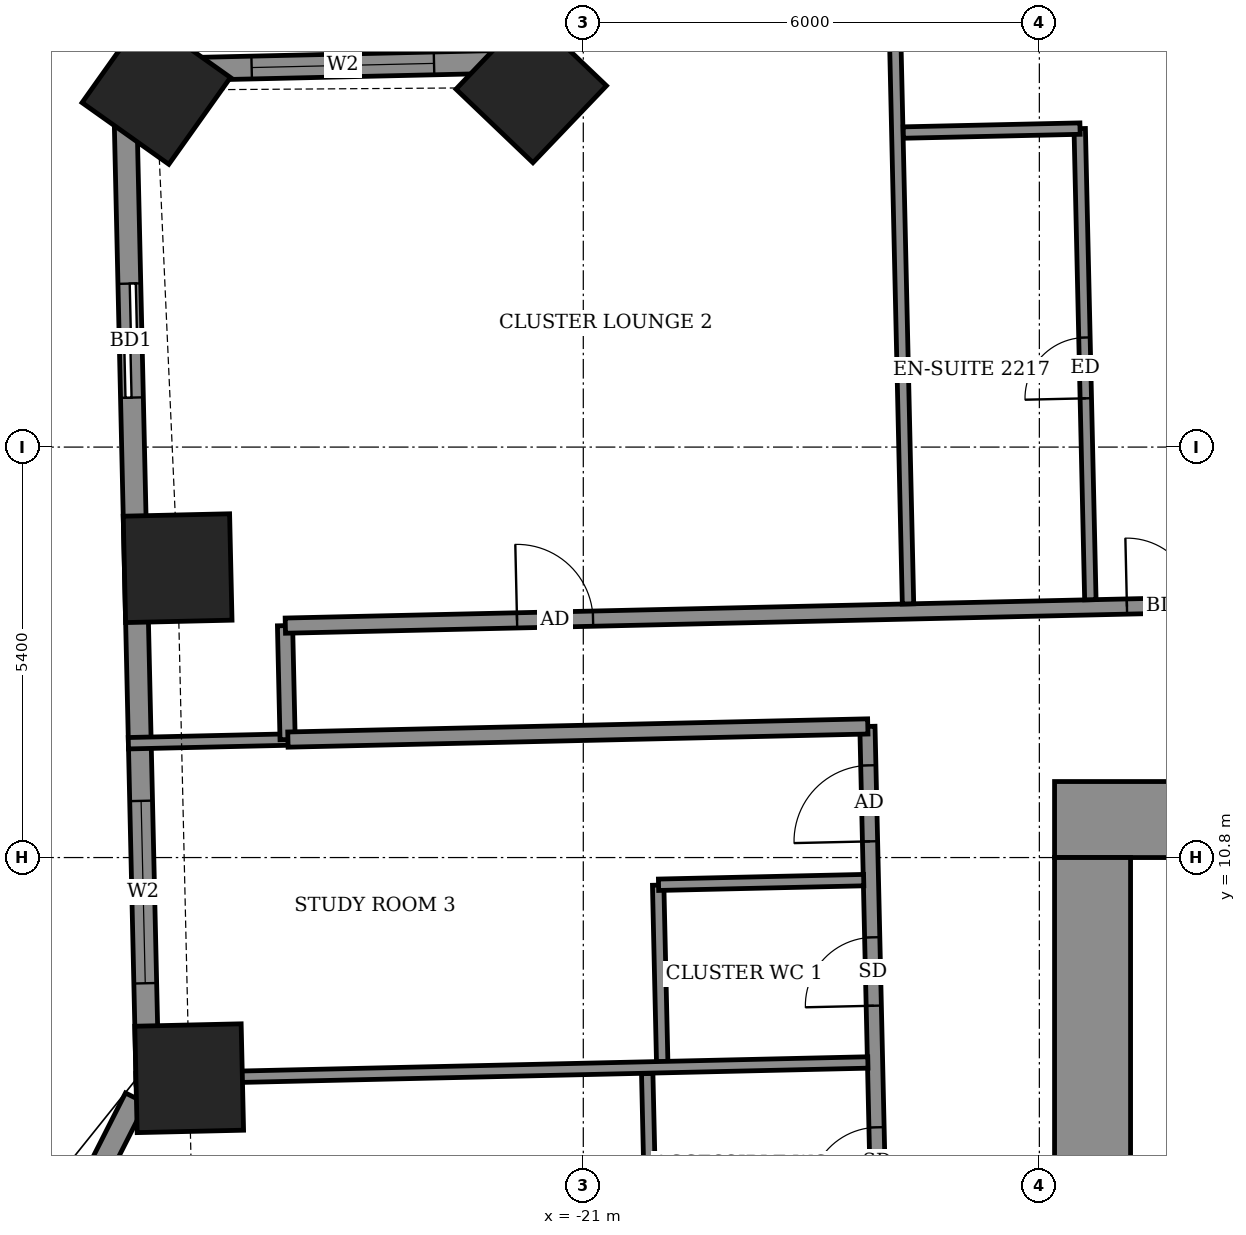
"""IFC4 building model, lengths in metres.
Left out: names, types, materials, properties, quantities, classifications, styles, units other than length and angle.
Written with IfcOpenShell. Run it as: python <this file> out.ifc"""

import sys

from ifc_helpers import new_model, si_unit, direction, frame, frame_2d, origin, origin_2d, place, context, subcontext, project, spatial, rectangle, extrude, element, fill, save


model = new_model("IFC4")
c1 = context("Model", 3, precision=1e-05, world=origin(), true_north=direction((0.0, 1.0)))
c2 = subcontext(c1, "Body", "Model", "MODEL_VIEW")
j1 = project(units=[si_unit("LENGTHUNIT", "METRE"), si_unit("PLANEANGLEUNIT", "RADIAN")], contexts=[c1])
p1 = place(None, origin())
s1 = spatial("IfcSite", under=j1, at=p1, CompositionType="ELEMENT")
p2 = place(p1, origin())
s2 = spatial("IfcBuilding", under=s1, at=p2, CompositionType="ELEMENT")
p3 = place(p2, frame((0.0, 0.0, 90.1)))
s3 = spatial("IfcBuildingStorey", under=s2, at=p3, CompositionType="ELEMENT", Elevation=90.1)
for number, where, z_axis, x_axis in (
    (1, (-21.685, 20.931, -0.55), (0.0, 0.0, 1.0), (-0.691, -0.723, 0.0)),
    (2, (-26.618, 20.897, -0.55), (0.0, 0.0, 1.0), (-0.579, -0.815, 0.0)),
    (3, (-26.337, 14.607, -0.55), (0.0, 0.0, 1.0), (0.023, -1.0, 0.0)),
    (4, (-26.185, 7.897, -0.55), (0.0, 0.0, 1.0), (0.023, -1.0, 0.0)),
):
    element("IfcColumn", number, at=place(p3, frame(where, z_axis=z_axis, x_axis=x_axis)), inside=s3, PredefinedType="COLUMN", context=c2, shape_type="SweptSolid", body=[
        extrude(rectangle(XDim=1.4, YDim=1.4, at=origin_2d()), origin(), (0.0, 0.0, 1.0), 3.6),
    ])
p4 = place(p3, frame((-22.151, 26.267, 0.0), z_axis=(0.0, 0.0, 1.0), x_axis=(0.022756903044, -0.999741028149, 0.0)))
e5 = element("IfcWall", 5, at=p4, inside=s3, PredefinedType="SOLIDWALL", context=c2, shape_type="SweptSolid", body=[
    extrude(rectangle(XDim=4.999, YDim=0.3, at=frame_2d((2.5, 0.0))), origin(), (0.0, 0.0, 1.0), 2.55),
])
p5 = place(p4, frame((1.674, 0.0, 0.9)))
e6 = element("IfcOpeningElement", 6, at=p5, cuts=e5, PredefinedType="OPENING", context=c2, shape_type="SweptSolid", body=[
    extrude(rectangle(XDim=2.4, YDim=1.5, at=frame_2d((1.2, 0.75))), frame((0.0, 0.16, 0.0), z_axis=(0.0, -1.0, 0.0), x_axis=(1.0, 0.0, 0.0)), (0.0, 0.0, 1.0), 0.32),
])
p6 = place(p3, frame((-22.037, 21.269, 0.0), z_axis=(0.0, 0.0, 1.0), x_axis=(-0.999739992103, -0.022802372469, 0.0)))
e7 = element("IfcWall", 7, at=p6, inside=s3, PredefinedType="SOLIDWALL", context=c2, shape_type="SweptSolid", body=[
    extrude(rectangle(XDim=5.0, YDim=0.3, at=frame_2d((2.5, 0.0))), origin(), (0.0, 0.0, 1.0), 2.55),
])
p7 = place(p6, frame((0.927, 0.0, 0.9)))
e8 = element("IfcOpeningElement", 8, at=p7, cuts=e7, PredefinedType="OPENING", context=c2, shape_type="SweptSolid", body=[
    extrude(rectangle(XDim=2.4, YDim=1.5, at=frame_2d((1.2, 0.75))), frame((0.0, 0.16, 0.0), z_axis=(0.0, -1.0, 0.0), x_axis=(1.0, 0.0, 0.0)), (0.0, 0.0, 1.0), 0.32),
])
p8 = place(p3, frame((-27.036, 21.155, 0.0), z_axis=(0.0, 0.0, 1.0), x_axis=(0.022730142562, -0.999741636934, 0.0)))
e9 = element("IfcWall", 9, at=p8, inside=s3, PredefinedType="SOLIDWALL", context=c2, shape_type="SweptSolid", body=[
    extrude(rectangle(XDim=13.329, YDim=0.3, at=frame_2d((6.665, 0.0))), origin(), (0.0, 0.0, 1.0), 3.05),
])
p9 = place(p8, frame((2.805, 0.0, 0.0)))
e10 = element("IfcOpeningElement", 10, at=p9, cuts=e9, PredefinedType="OPENING", context=c2, shape_type="SweptSolid", body=[
    extrude(rectangle(XDim=1.5, YDim=2.4, at=frame_2d((0.75, 1.2))), frame((0.0, 0.16, 0.0), z_axis=(0.0, -1.0, 0.0), x_axis=(1.0, 0.0, 0.0)), (0.0, 0.0, 1.0), 0.32),
])
p10 = place(p8, frame((9.612, 0.0, 0.9)))
e11 = element("IfcOpeningElement", 11, at=p10, cuts=e9, PredefinedType="OPENING", context=c2, shape_type="SweptSolid", body=[
    extrude(rectangle(XDim=2.4, YDim=1.5, at=frame_2d((1.2, 0.75))), frame((0.0, 0.16, 0.0), z_axis=(0.0, -1.0, 0.0), x_axis=(1.0, 0.0, 0.0)), (0.0, 0.0, 1.0), 0.32),
])
p11 = place(p3, frame((-26.889, 7.635, 0.0), z_axis=(0.0, 0.0, 1.0), x_axis=(-0.452633159278, -0.891696822425, 0.0)))
e12 = element("IfcWall", 12, at=p11, inside=s3, PredefinedType="SOLIDWALL", context=c2, shape_type="SweptSolid", body=[
    extrude(rectangle(XDim=5.397, YDim=0.3, at=frame_2d((2.699, 0.0))), origin(), (0.0, 0.0, 1.0), 3.05),
])
p12 = place(p11, frame((2.007, 0.0, 0.9)))
e13 = element("IfcOpeningElement", 13, at=p12, cuts=e12, PredefinedType="OPENING", context=c2, shape_type="SweptSolid", body=[
    extrude(rectangle(XDim=1.2, YDim=1.5, at=frame_2d((0.6, 0.75))), frame((0.0, 0.16, 0.0), z_axis=(0.0, -1.0, 0.0), x_axis=(1.0, 0.0, 0.0)), (0.0, 0.0, 1.0), 0.32),
])
p13 = place(p3, frame((-16.684, -12.919, 0.0), z_axis=(0.0, 0.0, 1.0), x_axis=(-0.022706151961, 0.999742182097, 0.0)))
e14 = element("IfcWall", 14, at=p13, inside=s3, PredefinedType="PARTITIONING", context=c2, shape_type="SweptSolid", body=[
    extrude(rectangle(XDim=25.45, YDim=0.2, at=frame_2d((12.725, 0.0))), origin(), (0.0, 0.0, 1.0), 3.05),
])
p14 = place(p13, frame((23.938, 0.0, 0.0)))
e15 = element("IfcOpeningElement", 15, at=p14, cuts=e14, PredefinedType="OPENING", context=c2, shape_type="SweptSolid", body=[
    extrude(rectangle(XDim=1.0, YDim=2.1, at=frame_2d((0.5, 1.05))), frame((0.0, 0.11, 0.0), z_axis=(0.0, -1.0, 0.0), x_axis=(1.0, 0.0, 0.0)), (0.0, 0.0, 1.0), 0.22),
])
p15 = place(p13, frame((21.775, 0.0, 0.0)))
e16 = element("IfcOpeningElement", 16, at=p15, cuts=e14, PredefinedType="OPENING", context=c2, shape_type="SweptSolid", body=[
    extrude(rectangle(XDim=0.9, YDim=2.1, at=frame_2d((0.45, 1.05))), frame((0.0, 0.11, 0.0), z_axis=(0.0, -1.0, 0.0), x_axis=(1.0, 0.0, 0.0)), (0.0, 0.0, 1.0), 0.22),
])
p16 = place(p13, frame((16.975, 0.0, 0.0)))
e17 = element("IfcOpeningElement", 17, at=p16, cuts=e14, PredefinedType="OPENING", context=c2, shape_type="SweptSolid", body=[
    extrude(rectangle(XDim=1.0, YDim=2.1, at=frame_2d((0.5, 1.05))), frame((0.0, 0.11, 0.0), z_axis=(0.0, -1.0, 0.0), x_axis=(1.0, 0.0, 0.0)), (0.0, 0.0, 1.0), 0.22),
])
p17 = place(p13, frame((19.275, 0.0, 0.0)))
e18 = element("IfcOpeningElement", 18, at=p17, cuts=e14, PredefinedType="OPENING", context=c2, shape_type="SweptSolid", body=[
    extrude(rectangle(XDim=0.9, YDim=2.1, at=frame_2d((0.45, 1.05))), frame((0.0, 0.11, 0.0), z_axis=(0.0, -1.0, 0.0), x_axis=(1.0, 0.0, 0.0)), (0.0, 0.0, 1.0), 0.22),
])
p18 = place(p13, frame((15.075, 0.0, 0.0)))
e19 = element("IfcOpeningElement", 19, at=p18, cuts=e14, PredefinedType="OPENING", context=c2, shape_type="SweptSolid", body=[
    extrude(rectangle(XDim=1.0, YDim=2.1, at=frame_2d((0.5, 1.05))), frame((0.0, 0.11, 0.0), z_axis=(0.0, -1.0, 0.0), x_axis=(1.0, 0.0, 0.0)), (0.0, 0.0, 1.0), 0.22),
])
p19 = place(p13, frame((12.975, 0.0, 0.0)))
e20 = element("IfcOpeningElement", 20, at=p19, cuts=e14, PredefinedType="OPENING", context=c2, shape_type="SweptSolid", body=[
    extrude(rectangle(XDim=0.9, YDim=2.1, at=frame_2d((0.45, 1.05))), frame((0.0, 0.11, 0.0), z_axis=(0.0, -1.0, 0.0), x_axis=(1.0, 0.0, 0.0)), (0.0, 0.0, 1.0), 0.22),
])
p20 = place(p13, frame((10.55, 0.0, 0.0)))
e21 = element("IfcOpeningElement", 21, at=p20, cuts=e14, PredefinedType="OPENING", context=c2, shape_type="SweptSolid", body=[
    extrude(rectangle(XDim=1.0, YDim=2.1, at=frame_2d((0.5, 1.05))), frame((0.0, 0.11, 0.0), z_axis=(0.0, -1.0, 0.0), x_axis=(1.0, 0.0, 0.0)), (0.0, 0.0, 1.0), 0.22),
])
p21 = place(p13, frame((8.125, 0.0, 0.0)))
e22 = element("IfcOpeningElement", 22, at=p21, cuts=e14, PredefinedType="OPENING", context=c2, shape_type="SweptSolid", body=[
    extrude(rectangle(XDim=0.9, YDim=2.1, at=frame_2d((0.45, 1.05))), frame((0.0, 0.11, 0.0), z_axis=(0.0, -1.0, 0.0), x_axis=(1.0, 0.0, 0.0)), (0.0, 0.0, 1.0), 0.22),
])
p22 = place(p13, frame((1.737, 0.0, 0.0)))
e23 = element("IfcOpeningElement", 23, at=p22, cuts=e14, PredefinedType="OPENING", context=c2, shape_type="SweptSolid", body=[
    extrude(rectangle(XDim=1.0, YDim=2.1, at=frame_2d((0.5, 1.05))), frame((0.0, 0.11, 0.0), z_axis=(0.0, -1.0, 0.0), x_axis=(1.0, 0.0, 0.0)), (0.0, 0.0, 1.0), 0.22),
])
p23 = place(p13, frame((5.425, 0.0, 0.0)))
e24 = element("IfcOpeningElement", 24, at=p23, cuts=e14, PredefinedType="OPENING", context=c2, shape_type="SweptSolid", body=[
    extrude(rectangle(XDim=0.9, YDim=2.1, at=frame_2d((0.45, 1.05))), frame((0.0, 0.11, 0.0), z_axis=(0.0, -1.0, 0.0), x_axis=(1.0, 0.0, 0.0)), (0.0, 0.0, 1.0), 0.22),
])
p24 = place(p3, frame((-20.101, 5.434, 0.0), z_axis=(0.0, 0.0, 1.0), x_axis=(-0.022919108675, 0.999737322729, 0.0)))
e25 = element("IfcWall", 25, at=p24, inside=s3, PredefinedType="PARTITIONING", context=c2, shape_type="SweptSolid", body=[
    extrude(rectangle(XDim=2.525, YDim=0.15, at=frame_2d((1.262, 0.0))), origin(), (0.0, 0.0, 1.0), 3.05),
])
p25 = place(p3, frame((-19.962, 8.112, 0.0), z_axis=(0.0, 0.0, 1.0), x_axis=(-0.022781023197, 0.999740478815, 0.0)))
e26 = element("IfcWall", 26, at=p25, inside=s3, PredefinedType="PARTITIONING", context=c2, shape_type="SweptSolid", body=[
    extrude(rectangle(XDim=2.325, YDim=0.15, at=frame_2d((1.163, 0.0))), origin(), (0.0, 0.0, 1.0), 3.05),
])
p26 = place(p3, frame((-26.885, 7.885, 0.0), z_axis=(0.0, 0.0, 1.0), x_axis=(0.999741468995, 0.022737527832, 0.0)))
e27 = element("IfcWall", 27, at=p26, inside=s3, PredefinedType="PARTITIONING", context=c2, shape_type="SweptSolid", body=[
    extrude(rectangle(XDim=9.631, YDim=0.15, at=frame_2d((4.816, 0.0))), origin(), (0.0, 0.0, 1.0), 3.05),
])
p27 = place(p3, frame((-20.01, 10.442, 0.0), z_axis=(0.0, 0.0, 1.0), x_axis=(0.999744396973, 0.02260842146, 0.0)))
e28 = element("IfcWall", 28, at=p27, inside=s3, PredefinedType="PARTITIONING", context=c2, shape_type="SweptSolid", body=[
    extrude(rectangle(XDim=2.7, YDim=0.15, at=frame_2d((1.35, 0.0))), origin(), (0.0, 0.0, 1.0), 3.05),
])
p28 = place(p3, frame((-26.985, 12.304, 0.0), z_axis=(0.0, 0.0, 1.0), x_axis=(0.999738589876, 0.02286376854, 0.0)))
e29 = element("IfcWall", 29, at=p28, inside=s3, PredefinedType="PARTITIONING", context=c2, shape_type="SweptSolid", body=[
    extrude(rectangle(XDim=2.104, YDim=0.15, at=frame_2d((1.052, 0.0))), origin(), (0.0, 0.0, 1.0), 2.55),
])
p29 = place(p3, frame((-24.89, 12.352, 0.0), z_axis=(0.0, 0.0, 1.0), x_axis=(-0.02279537805, 0.999740151609, 0.0)))
e30 = element("IfcWall", 30, at=p29, inside=s3, PredefinedType="PARTITIONING", context=c2, shape_type="SweptSolid", body=[
    extrude(rectangle(XDim=1.5, YDim=0.2, at=frame_2d((0.75, 0.0))), origin(), (0.0, 0.0, 1.0), 3.05),
])
p30 = place(p3, frame((-24.886, 12.352, 0.0), z_axis=(0.0, 0.0, 1.0), x_axis=(0.999743418763, 0.0226516366, 0.0)))
e31 = element("IfcWall", 31, at=p30, inside=s3, PredefinedType="PARTITIONING", context=c2, shape_type="SweptSolid", body=[
    extrude(rectangle(XDim=7.631, YDim=0.2, at=frame_2d((3.815, 0.0))), origin(), (0.0, 0.0, 1.0), 3.05),
])
p31 = place(p3, frame((-24.92, 13.851, 0.0), z_axis=(0.0, 0.0, 1.0), x_axis=(0.999742411711, 0.022696039895, 0.0)))
e32 = element("IfcWall", 32, at=p31, inside=s3, PredefinedType="PARTITIONING", context=c2, shape_type="SweptSolid", body=[
    extrude(rectangle(XDim=52.472, YDim=0.2, at=frame_2d((26.236, 0.0))), origin(), (0.0, 0.0, 1.0), 3.05),
])
p32 = place(p31, frame((50.088, 0.0, 0.0)))
e33 = element("IfcOpeningElement", 33, at=p32, cuts=e32, PredefinedType="OPENING", context=c2, shape_type="SweptSolid", body=[
    extrude(rectangle(XDim=1.0, YDim=2.1, at=frame_2d((0.5, 1.05))), frame((0.0, 0.11, 0.0), z_axis=(0.0, -1.0, 0.0), x_axis=(1.0, 0.0, 0.0)), (0.0, 0.0, 1.0), 0.22),
])
p33 = place(p31, frame((45.725, 0.0, 0.0)))
e34 = element("IfcOpeningElement", 34, at=p33, cuts=e32, PredefinedType="OPENING", context=c2, shape_type="SweptSolid", body=[
    extrude(rectangle(XDim=0.9, YDim=2.1, at=frame_2d((0.45, 1.05))), frame((0.0, 0.11, 0.0), z_axis=(0.0, -1.0, 0.0), x_axis=(1.0, 0.0, 0.0)), (0.0, 0.0, 1.0), 0.22),
])
p34 = place(p31, frame((38.975, 0.0, 0.0)))
e35 = element("IfcOpeningElement", 35, at=p34, cuts=e32, PredefinedType="OPENING", context=c2, shape_type="SweptSolid", body=[
    extrude(rectangle(XDim=0.9, YDim=2.1, at=frame_2d((0.45, 1.05))), frame((0.0, 0.11, 0.0), z_axis=(0.0, -1.0, 0.0), x_axis=(1.0, 0.0, 0.0)), (0.0, 0.0, 1.0), 0.22),
])
p35 = place(p31, frame((37.05, 0.0, 0.0)))
e36 = element("IfcOpeningElement", 36, at=p35, cuts=e32, PredefinedType="OPENING", context=c2, shape_type="SweptSolid", body=[
    extrude(rectangle(XDim=0.9, YDim=2.1, at=frame_2d((0.45, 1.05))), frame((0.0, 0.11, 0.0), z_axis=(0.0, -1.0, 0.0), x_axis=(1.0, 0.0, 0.0)), (0.0, 0.0, 1.0), 0.22),
])
p36 = place(p31, frame((30.35, 0.0, 0.0)))
e37 = element("IfcOpeningElement", 37, at=p36, cuts=e32, PredefinedType="OPENING", context=c2, shape_type="SweptSolid", body=[
    extrude(rectangle(XDim=0.9, YDim=2.1, at=frame_2d((0.45, 1.05))), frame((0.0, 0.11, 0.0), z_axis=(0.0, -1.0, 0.0), x_axis=(1.0, 0.0, 0.0)), (0.0, 0.0, 1.0), 0.22),
])
p37 = place(p31, frame((28.4, 0.0, 0.0)))
e38 = element("IfcOpeningElement", 38, at=p37, cuts=e32, PredefinedType="OPENING", context=c2, shape_type="SweptSolid", body=[
    extrude(rectangle(XDim=0.9, YDim=2.1, at=frame_2d((0.45, 1.05))), frame((0.0, 0.11, 0.0), z_axis=(0.0, -1.0, 0.0), x_axis=(1.0, 0.0, 0.0)), (0.0, 0.0, 1.0), 0.22),
])
p38 = place(p31, frame((21.675, 0.0, 0.0)))
e39 = element("IfcOpeningElement", 39, at=p38, cuts=e32, PredefinedType="OPENING", context=c2, shape_type="SweptSolid", body=[
    extrude(rectangle(XDim=0.9, YDim=2.1, at=frame_2d((0.45, 1.05))), frame((0.0, 0.11, 0.0), z_axis=(0.0, -1.0, 0.0), x_axis=(1.0, 0.0, 0.0)), (0.0, 0.0, 1.0), 0.22),
])
p39 = place(p31, frame((19.775, 0.0, 0.0)))
e40 = element("IfcOpeningElement", 40, at=p39, cuts=e32, PredefinedType="OPENING", context=c2, shape_type="SweptSolid", body=[
    extrude(rectangle(XDim=0.9, YDim=2.1, at=frame_2d((0.45, 1.05))), frame((0.0, 0.11, 0.0), z_axis=(0.0, -1.0, 0.0), x_axis=(1.0, 0.0, 0.0)), (0.0, 0.0, 1.0), 0.22),
])
p40 = place(p31, frame((13.0, 0.0, 0.0)))
e41 = element("IfcOpeningElement", 41, at=p40, cuts=e32, PredefinedType="OPENING", context=c2, shape_type="SweptSolid", body=[
    extrude(rectangle(XDim=0.9, YDim=2.1, at=frame_2d((0.45, 1.05))), frame((0.0, 0.11, 0.0), z_axis=(0.0, -1.0, 0.0), x_axis=(1.0, 0.0, 0.0)), (0.0, 0.0, 1.0), 0.22),
])
p41 = place(p31, frame((11.075, 0.0, 0.0)))
e42 = element("IfcOpeningElement", 42, at=p41, cuts=e32, PredefinedType="OPENING", context=c2, shape_type="SweptSolid", body=[
    extrude(rectangle(XDim=0.9, YDim=2.1, at=frame_2d((0.45, 1.05))), frame((0.0, 0.11, 0.0), z_axis=(0.0, -1.0, 0.0), x_axis=(1.0, 0.0, 0.0)), (0.0, 0.0, 1.0), 0.22),
])
p42 = place(p31, frame((3.049, 0.0, 0.0)))
e43 = element("IfcOpeningElement", 43, at=p42, cuts=e32, PredefinedType="OPENING", context=c2, shape_type="SweptSolid", body=[
    extrude(rectangle(XDim=1.0, YDim=2.1, at=frame_2d((0.5, 1.05))), frame((0.0, 0.11, 0.0), z_axis=(0.0, -1.0, 0.0), x_axis=(1.0, 0.0, 0.0)), (0.0, 0.0, 1.0), 0.22),
])
p43 = place(p3, frame((-16.728, 14.137, 0.0), z_axis=(0.0, 0.0, 1.0), x_axis=(-0.022661475803, 0.999743195783, 0.0)))
e44 = element("IfcWall", 44, at=p43, inside=s3, PredefinedType="PARTITIONING", context=c2, shape_type="SweptSolid", body=[
    extrude(rectangle(XDim=12.4, YDim=0.15, at=frame_2d((6.2, 0.0))), origin(), (0.0, 0.0, 1.0), 2.55),
])
p44 = place(p3, frame((-14.329, 14.192, 0.0), z_axis=(0.0, 0.0, 1.0), x_axis=(-0.022564860101, 0.999745381129, 0.0)))
e45 = element("IfcWall", 45, at=p44, inside=s3, PredefinedType="PARTITIONING", context=c2, shape_type="SweptSolid", body=[
    extrude(rectangle(XDim=6.199, YDim=0.15, at=frame_2d((3.1, 0.0))), origin(), (0.0, 0.0, 1.0), 3.05),
])
p45 = place(p44, frame((2.65, 0.0, 0.0)))
e46 = element("IfcOpeningElement", 46, at=p45, cuts=e45, PredefinedType="OPENING", context=c2, shape_type="SweptSolid", body=[
    extrude(rectangle(XDim=0.8, YDim=2.1, at=frame_2d((0.4, 1.05))), frame((0.0, 0.085, 0.0), z_axis=(0.0, -1.0, 0.0), x_axis=(1.0, 0.0, 0.0)), (0.0, 0.0, 1.0), 0.17),
])
p46 = place(p3, frame((-16.79, 20.338, 0.0), z_axis=(0.0, 0.0, 1.0), x_axis=(0.999749954681, 0.022361308448, 0.0)))
e47 = element("IfcWall", 47, at=p46, inside=s3, PredefinedType="PARTITIONING", context=c2, shape_type="SweptSolid", body=[
    extrude(rectangle(XDim=2.325, YDim=0.15, at=frame_2d((1.163, 0.0))), origin(), (0.0, 0.0, 1.0), 3.05),
])
p47 = place(p3, frame((-14.8, 11.3, 0.0), z_axis=(0.0, 0.0, 1.0), x_axis=(1.0, 0.0, 0.0)))
e48 = element("IfcWall", 48, at=p47, inside=s3, PredefinedType="SHEAR", context=c2, shape_type="SweptSolid", body=[
    extrude(rectangle(XDim=29.6, YDim=1.0, at=frame_2d((14.8, 0.0))), origin(), (0.0, 0.0, 1.0), 3.6),
])
p48 = place(p3, frame((-14.3, -10.8, 0.0), z_axis=(0.0, 0.0, 1.0), x_axis=(0.0, 1.0, 0.0)))
e49 = element("IfcWall", 49, at=p48, inside=s3, PredefinedType="SHEAR", context=c2, shape_type="SweptSolid", body=[
    extrude(rectangle(XDim=21.6, YDim=1.0, at=frame_2d((10.8, 0.0))), origin(), (0.0, 0.0, 1.0), 3.6),
])
p49 = place(p48, frame((8.25, 0.0, 0.0)))
e50 = element("IfcOpeningElement", 50, at=p49, cuts=e49, PredefinedType="OPENING", context=c2, shape_type="SweptSolid", body=[
    extrude(rectangle(XDim=1.2, YDim=2.1, at=frame_2d((0.6, 1.05))), frame((0.0, 0.51, 0.0), z_axis=(0.0, -1.0, 0.0), x_axis=(1.0, 0.0, 0.0)), (0.0, 0.0, 1.0), 1.02),
])
p50 = place(p48, frame((15.25, 0.0, 0.0)))
e51 = element("IfcOpeningElement", 51, at=p50, cuts=e49, PredefinedType="OPENING", context=c2, shape_type="SweptSolid", body=[
    extrude(rectangle(XDim=1.2, YDim=2.1, at=frame_2d((0.6, 1.05))), frame((0.0, 0.51, 0.0), z_axis=(0.0, -1.0, 0.0), x_axis=(1.0, 0.0, 0.0)), (0.0, 0.0, 1.0), 1.02),
])
p51 = place(p7, origin())
e52 = element("IfcWindow", 52, at=p51, inside=s3, PartitioningType="DOUBLE_PANEL_VERTICAL", PredefinedType="WINDOW", context=c2, shape_type="SweptSolid", body=[
    extrude(rectangle(XDim=2.4, YDim=1.5, at=frame_2d((1.2, 0.75))), frame((0.0, 0.03, 0.0), z_axis=(0.0, -1.0, 0.0), x_axis=(1.0, 0.0, 0.0)), (0.0, 0.0, 1.0), 0.06),
])
fill(e8, e52)
p52 = place(p9, origin())
e53 = element("IfcDoor", 53, at=p52, inside=s3, OperationType="SLIDING_TO_LEFT", PredefinedType="DOOR", context=c2, shape_type="SweptSolid", body=[
    extrude(rectangle(XDim=1.5, YDim=2.4, at=frame_2d((0.75, 1.2))), frame((0.0, 0.025, 0.0), z_axis=(0.0, -1.0, 0.0), x_axis=(1.0, 0.0, 0.0)), (0.0, 0.0, 1.0), 0.05),
])
fill(e10, e53)
p53 = place(p10, origin())
e54 = element("IfcWindow", 54, at=p53, inside=s3, PartitioningType="DOUBLE_PANEL_VERTICAL", PredefinedType="WINDOW", context=c2, shape_type="SweptSolid", body=[
    extrude(rectangle(XDim=2.4, YDim=1.5, at=frame_2d((1.2, 0.75))), frame((0.0, 0.03, 0.0), z_axis=(0.0, -1.0, 0.0), x_axis=(1.0, 0.0, 0.0)), (0.0, 0.0, 1.0), 0.06),
])
fill(e11, e54)
p54 = place(p41, origin())
e55 = element("IfcDoor", 55, at=p54, inside=s3, OperationType="SINGLE_SWING_LEFT", PredefinedType="DOOR", context=c2, shape_type="SweptSolid", body=[
    extrude(rectangle(XDim=0.9, YDim=2.1, at=frame_2d((0.45, 1.05))), frame((0.0, 0.025, 0.0), z_axis=(0.0, -1.0, 0.0), x_axis=(1.0, 0.0, 0.0)), (0.0, 0.0, 1.0), 0.05),
])
fill(e42, e55)
p55 = place(p45, origin())
e56 = element("IfcDoor", 56, at=p55, inside=s3, OperationType="SINGLE_SWING_LEFT", PredefinedType="DOOR", context=c2, shape_type="SweptSolid", body=[
    extrude(rectangle(XDim=0.8, YDim=2.1, at=frame_2d((0.4, 1.05))), frame((0.0, 0.025, 0.0), z_axis=(0.0, -1.0, 0.0), x_axis=(1.0, 0.0, 0.0)), (0.0, 0.0, 1.0), 0.05),
])
fill(e46, e56)
p56 = place(p42, origin())
e57 = element("IfcDoor", 57, at=p56, inside=s3, OperationType="SINGLE_SWING_RIGHT", PredefinedType="DOOR", context=c2, shape_type="SweptSolid", body=[
    extrude(rectangle(XDim=1.0, YDim=2.1, at=frame_2d((0.5, 1.05))), frame((0.0, 0.025, 0.0), z_axis=(0.0, -1.0, 0.0), x_axis=(1.0, 0.0, 0.0)), (0.0, 0.0, 1.0), 0.05),
])
fill(e43, e57)
p57 = place(p14, origin())
e58 = element("IfcDoor", 58, at=p57, inside=s3, OperationType="SINGLE_SWING_LEFT", PredefinedType="DOOR", context=c2, shape_type="SweptSolid", body=[
    extrude(rectangle(XDim=1.0, YDim=2.1, at=frame_2d((0.5, 1.05))), frame((0.0, 0.025, 0.0), z_axis=(0.0, -1.0, 0.0), x_axis=(1.0, 0.0, 0.0)), (0.0, 0.0, 1.0), 0.05),
])
fill(e15, e58)
p58 = place(p15, origin())
e59 = element("IfcDoor", 59, at=p58, inside=s3, OperationType="SINGLE_SWING_LEFT", PredefinedType="DOOR", context=c2, shape_type="SweptSolid", body=[
    extrude(rectangle(XDim=0.9, YDim=2.1, at=frame_2d((0.45, 1.05))), frame((0.0, 0.025, 0.0), z_axis=(0.0, -1.0, 0.0), x_axis=(1.0, 0.0, 0.0)), (0.0, 0.0, 1.0), 0.05),
])
fill(e16, e59)
p59 = place(p17, origin())
e60 = element("IfcDoor", 60, at=p59, inside=s3, OperationType="SINGLE_SWING_RIGHT", PredefinedType="DOOR", context=c2, shape_type="SweptSolid", body=[
    extrude(rectangle(XDim=0.9, YDim=2.1, at=frame_2d((0.45, 1.05))), frame((0.0, 0.025, 0.0), z_axis=(0.0, -1.0, 0.0), x_axis=(1.0, 0.0, 0.0)), (0.0, 0.0, 1.0), 0.05),
])
fill(e18, e60)
save(model, sys.argv[1])
